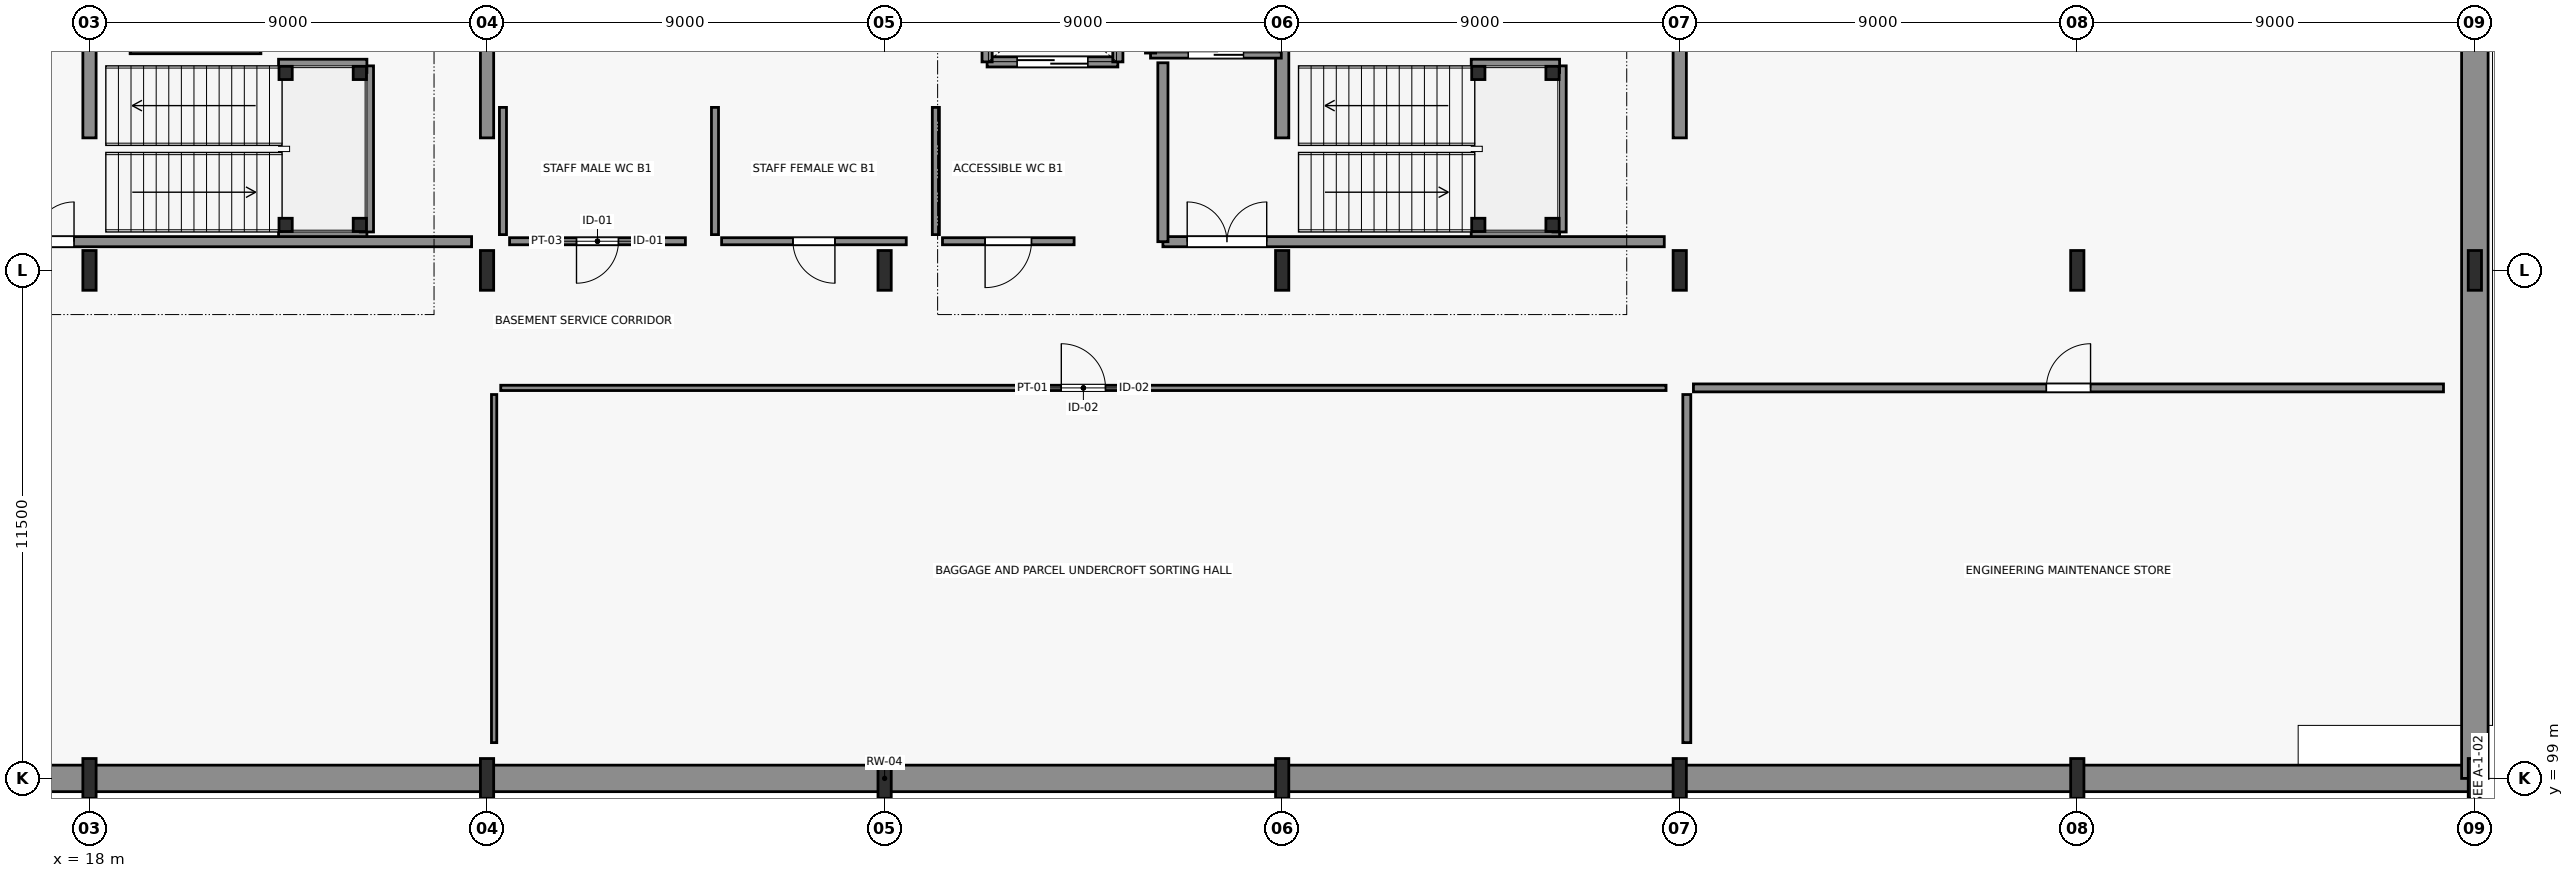
"""IFC4 building model, lengths in metres.
Left out: names, types, materials, properties, quantities, classifications, styles, units other than length and angle.
Written with IfcOpenShell. Run it as: python <this file> out.ifc"""

import sys

from ifc_helpers import new_model, si_unit, direction, frame, frame_2d, origin, origin_2d, place, context, subcontext, project, spatial, rectangle, hollow_rectangle, i_section, extrude, element, fill, save


model = new_model("IFC4")
c1 = context("Model", 3, precision=1e-05, world=origin(), true_north=direction((0.0, 1.0)))
c2 = subcontext(c1, "Body", "Model", "MODEL_VIEW")
j1 = project(units=[si_unit("LENGTHUNIT", "METRE"), si_unit("PLANEANGLEUNIT", "RADIAN")], contexts=[c1])
p1 = place(None, origin())
s1 = spatial("IfcSite", under=j1, at=p1, CompositionType="ELEMENT")
p2 = place(p1, origin())
s2 = spatial("IfcBuilding", under=s1, at=p2, CompositionType="ELEMENT")
p3 = place(p2, frame((0.0, 0.0, -4.8)))
s3 = spatial("IfcBuildingStorey", under=s2, at=p3, CompositionType="ELEMENT", Elevation=-4.8)
p4 = place(p3, frame((0.0, 99.0, 0.0), z_axis=(0.0, 0.0, 1.0), x_axis=(1.0, 0.0, 0.0)))
e1 = element("IfcWall", 1, at=p4, inside=s3, PredefinedType="USERDEFINED", context=c2, shape_type="SweptSolid", body=[
    extrude(rectangle(XDim=72.0, YDim=0.6, at=frame_2d((36.0, 0.0))), origin(), (0.0, 0.0, 1.0), 4.5),
])
p5 = place(p3, frame((72.0, 99.0, 0.0), z_axis=(0.0, 0.0, 1.0), x_axis=(0.0, 1.0, 0.0)))
e2 = element("IfcWall", 2, at=p5, inside=s3, PredefinedType="USERDEFINED", context=c2, shape_type="SweptSolid", body=[
    extrude(rectangle(XDim=33.0, YDim=0.6, at=frame_2d((16.5, 0.0))), origin(), (0.0, 0.0, 1.0), 4.5),
])
for number, where, z_axis, x_axis in (
    (3, (18.0, 99.0, 0.0), (0.0, 0.0, 1.0), (1.0, 0.0, 0.0)),
    (4, (18.0, 110.5, 0.0), (0.0, 0.0, 1.0), (1.0, 0.0, 0.0)),
    (5, (27.0, 99.0, 0.0), (0.0, 0.0, 1.0), (1.0, 0.0, 0.0)),
    (6, (27.0, 110.5, 0.0), (0.0, 0.0, 1.0), (1.0, 0.0, 0.0)),
    (7, (36.0, 99.0, 0.0), (0.0, 0.0, 1.0), (1.0, 0.0, 0.0)),
    (8, (36.0, 110.5, 0.0), (0.0, 0.0, 1.0), (1.0, 0.0, 0.0)),
    (9, (45.0, 99.0, 0.0), (0.0, 0.0, 1.0), (1.0, 0.0, 0.0)),
    (10, (45.0, 110.5, 0.0), (0.0, 0.0, 1.0), (1.0, 0.0, 0.0)),
    (11, (54.0, 99.0, 0.0), (0.0, 0.0, 1.0), (1.0, 0.0, 0.0)),
    (12, (54.0, 110.5, 0.0), (0.0, 0.0, 1.0), (1.0, 0.0, 0.0)),
    (13, (63.0, 99.0, 0.0), (0.0, 0.0, 1.0), (1.0, 0.0, 0.0)),
    (14, (63.0, 110.5, 0.0), (0.0, 0.0, 1.0), (1.0, 0.0, 0.0)),
    (15, (72.0, 99.0, 0.0), (0.0, 0.0, 1.0), (1.0, 0.0, 0.0)),
    (16, (72.0, 110.5, 0.0), (0.0, 0.0, 1.0), (1.0, 0.0, 0.0)),
):
    element("IfcColumn", number, at=place(p3, frame(where, z_axis=z_axis, x_axis=x_axis)), inside=s3, PredefinedType="COLUMN", context=c2, shape_type="SweptSolid", body=[
        extrude(i_section(OverallWidth=0.3, OverallDepth=0.9, WebThickness=0.019, FlangeThickness=0.035, FilletRadius=0.03, at=origin_2d()), origin(), (0.0, 0.0, 1.0), 4.5),
    ])
for number, where, z_axis, x_axis in (
    (17, (18.0, 113.5, 0.0), (0.0, 0.0, 1.0), (0.0, 1.0, 0.0)),
    (18, (27.0, 113.5, 0.0), (0.0, 0.0, 1.0), (0.0, 1.0, 0.0)),
    (19, (45.0, 113.5, 0.0), (0.0, 0.0, 1.0), (0.0, 1.0, 0.0)),
    (20, (54.0, 113.5, 0.0), (0.0, 0.0, 1.0), (0.0, 1.0, 0.0)),
):
    element("IfcWall", number, at=place(p3, frame(where, z_axis=z_axis, x_axis=x_axis)), inside=s3, PredefinedType="SHEAR", context=c2, shape_type="SweptSolid", body=[
        extrude(rectangle(XDim=4.825, YDim=0.3, at=frame_2d((2.413, 0.0))), origin(), (0.0, 0.0, 1.0), 4.5),
    ])
p6 = place(p3, frame((27.31, 107.84, 0.0), z_axis=(0.0, 0.0, 1.0), x_axis=(1.0, 0.0, 0.0)))
e21 = element("IfcWall", 21, at=p6, inside=s3, PredefinedType="PARTITIONING", context=c2, shape_type="SweptSolid", body=[
    extrude(rectangle(XDim=26.38, YDim=0.12, at=frame_2d((13.19, 0.0))), origin(), (0.0, 0.0, 1.0), 3.87),
])
p7 = place(p6, frame((12.69, 0.0, 0.0)))
e22 = element("IfcOpeningElement", 22, at=p7, cuts=e21, PredefinedType="OPENING", context=c2, shape_type="SweptSolid", body=[
    extrude(rectangle(XDim=1.0, YDim=2.15, at=frame_2d((0.5, 1.075))), frame((0.0, 0.07, 0.0), z_axis=(0.0, -1.0, 0.0), x_axis=(1.0, 0.0, 0.0)), (0.0, 0.0, 1.0), 0.14),
])
p8 = place(p3, frame((27.16, 99.81, 0.0), z_axis=(0.0, 0.0, 1.0), x_axis=(0.0, 1.0, 0.0)))
e23 = element("IfcWall", 23, at=p8, inside=s3, PredefinedType="PARTITIONING", context=c2, shape_type="SweptSolid", body=[
    extrude(rectangle(XDim=7.88, YDim=0.12, at=frame_2d((3.94, 0.0))), origin(), (0.0, 0.0, 1.0), 3.87),
])
p9 = place(p3, frame((54.31, 107.84, 0.0), z_axis=(0.0, 0.0, 1.0), x_axis=(1.0, 0.0, 0.0)))
e24 = element("IfcWall", 24, at=p9, inside=s3, PredefinedType="PARTITIONING", context=c2, shape_type="SweptSolid", body=[
    extrude(rectangle(XDim=16.98, YDim=0.18, at=frame_2d((8.49, 0.0))), origin(), (0.0, 0.0, 1.0), 3.87),
])
p10 = place(p9, frame((7.99, 0.0, 0.0)))
e25 = element("IfcOpeningElement", 25, at=p10, cuts=e24, PredefinedType="OPENING", context=c2, shape_type="SweptSolid", body=[
    extrude(rectangle(XDim=1.0, YDim=2.15, at=frame_2d((0.5, 1.075))), frame((0.0, 0.1, 0.0), z_axis=(0.0, -1.0, 0.0), x_axis=(1.0, 0.0, 0.0)), (0.0, 0.0, 1.0), 0.2),
])
p11 = place(p3, frame((54.16, 99.81, 0.0), z_axis=(0.0, 0.0, 1.0), x_axis=(0.0, 1.0, 0.0)))
e26 = element("IfcWall", 26, at=p11, inside=s3, PredefinedType="PARTITIONING", context=c2, shape_type="SweptSolid", body=[
    extrude(rectangle(XDim=7.88, YDim=0.18, at=frame_2d((3.94, 0.0))), origin(), (0.0, 0.0, 1.0), 3.87),
])
p12 = place(p3, frame((31.49, 111.16, 0.0), z_axis=(0.0, 0.0, 1.0), x_axis=(-1.0, 0.0, 0.0)))
e27 = element("IfcWall", 27, at=p12, inside=s3, PredefinedType="PARTITIONING", context=c2, shape_type="SweptSolid", body=[
    extrude(rectangle(XDim=3.98, YDim=0.16, at=frame_2d((1.99, 0.0))), origin(), (0.0, 0.0, 1.0), 4.2),
])
p13 = place(p12, frame((1.515, 0.0, 0.0)))
e28 = element("IfcOpeningElement", 28, at=p13, cuts=e27, PredefinedType="OPENING", context=c2, shape_type="SweptSolid", body=[
    extrude(rectangle(XDim=0.95, YDim=2.15, at=frame_2d((0.475, 1.075))), frame((0.0, 0.09, 0.0), z_axis=(0.0, -1.0, 0.0), x_axis=(1.0, 0.0, 0.0)), (0.0, 0.0, 1.0), 0.18),
])
p14 = place(p3, frame((27.36, 111.31, 0.0), z_axis=(0.0, 0.0, 1.0), x_axis=(0.0, 1.0, 0.0)))
e29 = element("IfcWall", 29, at=p14, inside=s3, PredefinedType="PARTITIONING", context=c2, shape_type="SweptSolid", body=[
    extrude(rectangle(XDim=2.88, YDim=0.16, at=frame_2d((1.44, 0.0))), origin(), (0.0, 0.0, 1.0), 4.45),
])
p15 = place(p3, frame((36.49, 111.16, 0.0), z_axis=(0.0, 0.0, 1.0), x_axis=(-1.0, 0.0, 0.0)))
e30 = element("IfcWall", 30, at=p15, inside=s3, PredefinedType="PARTITIONING", context=c2, shape_type="SweptSolid", body=[
    extrude(rectangle(XDim=4.18, YDim=0.16, at=frame_2d((2.09, 0.0))), origin(), (0.0, 0.0, 1.0), 3.87),
])
p16 = place(p15, frame((1.615, 0.0, 0.0)))
e31 = element("IfcOpeningElement", 31, at=p16, cuts=e30, PredefinedType="OPENING", context=c2, shape_type="SweptSolid", body=[
    extrude(rectangle(XDim=0.95, YDim=2.15, at=frame_2d((0.475, 1.075))), frame((0.0, 0.09, 0.0), z_axis=(0.0, -1.0, 0.0), x_axis=(1.0, 0.0, 0.0)), (0.0, 0.0, 1.0), 0.18),
])
p17 = place(p3, frame((32.16, 111.31, 0.0), z_axis=(0.0, 0.0, 1.0), x_axis=(0.0, 1.0, 0.0)))
e32 = element("IfcWall", 32, at=p17, inside=s3, PredefinedType="PARTITIONING", context=c2, shape_type="SweptSolid", body=[
    extrude(rectangle(XDim=2.88, YDim=0.16, at=frame_2d((1.44, 0.0))), origin(), (0.0, 0.0, 1.0), 4.45),
])
p18 = place(p3, frame((40.29, 111.16, 0.0), z_axis=(0.0, 0.0, 1.0), x_axis=(-1.0, 0.0, 0.0)))
e33 = element("IfcWall", 33, at=p18, inside=s3, PredefinedType="PARTITIONING", context=c2, shape_type="SweptSolid", body=[
    extrude(rectangle(XDim=2.98, YDim=0.16, at=frame_2d((1.49, 0.0))), origin(), (0.0, 0.0, 1.0), 4.2),
])
p19 = place(p18, frame((0.965, 0.0, 0.0)))
e34 = element("IfcOpeningElement", 34, at=p19, cuts=e33, PredefinedType="OPENING", context=c2, shape_type="SweptSolid", body=[
    extrude(rectangle(XDim=1.05, YDim=2.2, at=frame_2d((0.525, 1.1))), frame((0.0, 0.09, 0.0), z_axis=(0.0, -1.0, 0.0), x_axis=(1.0, 0.0, 0.0)), (0.0, 0.0, 1.0), 0.18),
])
p20 = place(p3, frame((37.16, 111.31, 0.0), z_axis=(0.0, 0.0, 1.0), x_axis=(0.0, 1.0, 0.0)))
e35 = element("IfcWall", 35, at=p20, inside=s3, PredefinedType="PARTITIONING", context=c2, shape_type="SweptSolid", body=[
    extrude(rectangle(XDim=2.88, YDim=0.16, at=frame_2d((1.44, 0.0))), origin(), (0.0, 0.0, 1.0), 4.45),
])
p21 = place(p3, frame((21.88, 115.52, 0.0), z_axis=(0.0, 0.0, 1.0), x_axis=(-1.0, 0.0, 0.0)))
e36 = element("IfcWall", 36, at=p21, inside=s3, PredefinedType="SOLIDWALL", context=c2, shape_type="SweptSolid", body=[
    extrude(rectangle(XDim=2.96, YDim=0.23, at=frame_2d((1.48, 0.0))), origin(), (0.0, 0.0, 1.0), 4.56),
])
p22 = place(p3, frame((44.98, 115.42, 0.0), z_axis=(0.0, 0.0, 1.0), x_axis=(-1.0, 0.0, 0.0)))
e37 = element("IfcWall", 37, at=p22, inside=s3, PredefinedType="SOLIDWALL", context=c2, shape_type="SweptSolid", body=[
    extrude(rectangle(XDim=2.96, YDim=0.23, at=frame_2d((1.48, 0.0))), origin(), (0.0, 0.0, 1.0), 3.87),
])
p23 = place(p22, frame((0.855, 0.0, 0.0)))
e38 = element("IfcOpeningElement", 38, at=p23, cuts=e37, PredefinedType="OPENING", context=c2, shape_type="SweptSolid", body=[
    extrude(rectangle(XDim=1.25, YDim=2.2, at=frame_2d((0.625, 1.1))), frame((0.0, 0.125, 0.0), z_axis=(0.0, -1.0, 0.0), x_axis=(1.0, 0.0, 0.0)), (0.0, 0.0, 1.0), 0.25),
])
p24 = place(p3, frame((42.02, 115.42, 0.0), z_axis=(0.0, 0.0, 1.0), x_axis=(0.0, 1.0, 0.0)))
e39 = element("IfcWall", 39, at=p24, inside=s3, PredefinedType="SOLIDWALL", context=c2, shape_type="SweptSolid", body=[
    extrude(rectangle(XDim=2.16, YDim=0.23, at=frame_2d((1.08, 0.0))), origin(), (0.0, 0.0, 1.0), 4.2),
])
p25 = place(p3, frame((41.28, 115.22, 0.0), z_axis=(0.0, 0.0, 1.0), x_axis=(-1.0, 0.0, 0.0)))
e40 = element("IfcWall", 40, at=p25, inside=s3, PredefinedType="SOLIDWALL", context=c2, shape_type="SweptSolid", body=[
    extrude(rectangle(XDim=2.96, YDim=0.23, at=frame_2d((1.48, 0.0))), origin(), (0.0, 0.0, 1.0), 4.2),
])
p26 = place(p25, frame((0.68, 0.0, 0.0)))
e41 = element("IfcOpeningElement", 41, at=p26, cuts=e40, PredefinedType="OPENING", context=c2, shape_type="SweptSolid", body=[
    extrude(rectangle(XDim=1.6, YDim=2.3, at=frame_2d((0.8, 1.15))), frame((0.0, 0.125, 0.0), z_axis=(0.0, -1.0, 0.0), x_axis=(1.0, 0.0, 0.0)), (0.0, 0.0, 1.0), 0.25),
])
for number, where, z_axis, x_axis in (
    (42, (38.32, 115.22, 0.0), (0.0, 0.0, 1.0), (0.0, 1.0, 0.0)),
    (43, (41.28, 117.78, 0.0), (0.0, 0.0, 1.0), (0.0, -1.0, 0.0)),
):
    element("IfcWall", number, at=place(p3, frame(where, z_axis=z_axis, x_axis=x_axis)), inside=s3, PredefinedType="SOLIDWALL", context=c2, shape_type="SweptSolid", body=[
        extrude(rectangle(XDim=2.56, YDim=0.23, at=frame_2d((1.28, 0.0))), origin(), (0.0, 0.0, 1.0), 4.56),
    ])
p27 = place(p3, frame((22.28, 111.37, 0.0), z_axis=(0.0, 0.0, 1.0), x_axis=(1.0, 0.0, 0.0)))
e44 = element("IfcWall", 44, at=p27, inside=s3, PredefinedType="SHEAR", context=c2, shape_type="SweptSolid", body=[
    extrude(rectangle(XDim=2.0, YDim=0.3, at=frame_2d((1.0, 0.0))), origin(), (0.0, 0.0, 1.0), 2.08),
])
p28 = place(p3, frame((24.28, 111.37, 0.0), z_axis=(0.0, 0.0, 1.0), x_axis=(0.0, 1.0, 0.0)))
e45 = element("IfcWall", 45, at=p28, inside=s3, PredefinedType="SHEAR", context=c2, shape_type="SweptSolid", body=[
    extrude(rectangle(XDim=3.76, YDim=0.3, at=frame_2d((1.88, 0.0))), origin(), (0.0, 0.0, 1.0), 2.08),
])
p29 = place(p3, frame((24.28, 115.13, 0.0), z_axis=(0.0, 0.0, 1.0), x_axis=(-1.0, 0.0, 0.0)))
e46 = element("IfcWall", 46, at=p29, inside=s3, PredefinedType="SHEAR", context=c2, shape_type="SweptSolid", body=[
    extrude(rectangle(XDim=2.0, YDim=0.3, at=frame_2d((1.0, 0.0))), origin(), (0.0, 0.0, 1.0), 2.08),
])
for number, where, z_axis, x_axis in (
    (47, (22.44, 111.53, 0.0), (0.0, 0.0, 1.0), (1.0, 0.0, 0.0)),
    (48, (24.12, 111.53, 0.0), (0.0, 0.0, 1.0), (1.0, 0.0, 0.0)),
    (49, (24.12, 114.97, 0.0), (0.0, 0.0, 1.0), (1.0, 0.0, 0.0)),
    (50, (22.44, 114.97, 0.0), (0.0, 0.0, 1.0), (1.0, 0.0, 0.0)),
):
    element("IfcColumn", number, at=place(p3, frame(where, z_axis=z_axis, x_axis=x_axis)), inside=s3, PredefinedType="COLUMN", context=c2, shape_type="SweptSolid", body=[
        extrude(hollow_rectangle(XDim=0.3, YDim=0.3, WallThickness=0.016, at=origin_2d()), origin(), (0.0, 0.0, 1.0), 4.8),
    ])
p30 = place(p3, frame((49.28, 111.37, 0.0), z_axis=(0.0, 0.0, 1.0), x_axis=(1.0, 0.0, 0.0)))
e51 = element("IfcWall", 51, at=p30, inside=s3, PredefinedType="SHEAR", context=c2, shape_type="SweptSolid", body=[
    extrude(rectangle(XDim=2.0, YDim=0.3, at=frame_2d((1.0, 0.0))), origin(), (0.0, 0.0, 1.0), 2.08),
])
p31 = place(p3, frame((51.28, 111.37, 0.0), z_axis=(0.0, 0.0, 1.0), x_axis=(0.0, 1.0, 0.0)))
e52 = element("IfcWall", 52, at=p31, inside=s3, PredefinedType="SHEAR", context=c2, shape_type="SweptSolid", body=[
    extrude(rectangle(XDim=3.76, YDim=0.3, at=frame_2d((1.88, 0.0))), origin(), (0.0, 0.0, 1.0), 2.08),
])
p32 = place(p3, frame((51.28, 115.13, 0.0), z_axis=(0.0, 0.0, 1.0), x_axis=(-1.0, 0.0, 0.0)))
e53 = element("IfcWall", 53, at=p32, inside=s3, PredefinedType="SHEAR", context=c2, shape_type="SweptSolid", body=[
    extrude(rectangle(XDim=2.0, YDim=0.3, at=frame_2d((1.0, 0.0))), origin(), (0.0, 0.0, 1.0), 2.08),
])
for number, where, z_axis, x_axis in (
    (54, (49.44, 111.53, 0.0), (0.0, 0.0, 1.0), (1.0, 0.0, 0.0)),
    (55, (51.12, 111.53, 0.0), (0.0, 0.0, 1.0), (1.0, 0.0, 0.0)),
    (56, (51.12, 114.97, 0.0), (0.0, 0.0, 1.0), (1.0, 0.0, 0.0)),
    (57, (49.44, 114.97, 0.0), (0.0, 0.0, 1.0), (1.0, 0.0, 0.0)),
):
    element("IfcColumn", number, at=place(p3, frame(where, z_axis=z_axis, x_axis=x_axis)), inside=s3, PredefinedType="COLUMN", context=c2, shape_type="SweptSolid", body=[
        extrude(hollow_rectangle(XDim=0.3, YDim=0.3, WallThickness=0.016, at=origin_2d()), origin(), (0.0, 0.0, 1.0), 4.8),
    ])
p33 = place(p3, frame((15.3, 111.15, 0.0), z_axis=(0.0, 0.0, 1.0), x_axis=(1.0, 0.0, 0.0)))
e58 = element("IfcWall", 58, at=p33, inside=s3, PredefinedType="SOLIDWALL", context=c2, shape_type="SweptSolid", body=[
    extrude(rectangle(XDim=11.35, YDim=0.23, at=frame_2d((5.675, 0.0))), origin(), (0.0, 0.0, 1.0), 3.87),
])
p34 = place(p33, frame((0.55, 0.0, 0.0)))
e59 = element("IfcOpeningElement", 59, at=p34, cuts=e58, PredefinedType="OPENING", context=c2, shape_type="SweptSolid", body=[
    extrude(rectangle(XDim=1.8, YDim=2.3, at=frame_2d((0.9, 1.15))), frame((0.0, 0.125, 0.0), z_axis=(0.0, -1.0, 0.0), x_axis=(1.0, 0.0, 0.0)), (0.0, 0.0, 1.0), 0.25),
])
p35 = place(p3, frame((42.3, 111.15, 0.0), z_axis=(0.0, 0.0, 1.0), x_axis=(1.0, 0.0, 0.0)))
e60 = element("IfcWall", 60, at=p35, inside=s3, PredefinedType="SOLIDWALL", context=c2, shape_type="SweptSolid", body=[
    extrude(rectangle(XDim=11.35, YDim=0.23, at=frame_2d((5.675, 0.0))), origin(), (0.0, 0.0, 1.0), 3.87),
])
p36 = place(p35, frame((0.55, 0.0, 0.0)))
e61 = element("IfcOpeningElement", 61, at=p36, cuts=e60, PredefinedType="OPENING", context=c2, shape_type="SweptSolid", body=[
    extrude(rectangle(XDim=1.8, YDim=2.3, at=frame_2d((0.9, 1.15))), frame((0.0, 0.125, 0.0), z_axis=(0.0, -1.0, 0.0), x_axis=(1.0, 0.0, 0.0)), (0.0, 0.0, 1.0), 0.25),
])
p37 = place(p3, frame((42.3, 111.15, 0.0), z_axis=(0.0, 0.0, 1.0), x_axis=(0.0, 1.0, 0.0)))
e62 = element("IfcWall", 62, at=p37, inside=s3, PredefinedType="SOLIDWALL", context=c2, shape_type="SweptSolid", body=[
    extrude(rectangle(XDim=4.05, YDim=0.23, at=frame_2d((2.025, 0.0))), origin(), (0.0, 0.0, 1.0), 4.55),
])
p38 = place(p7, origin())
e63 = element("IfcDoor", 63, at=p38, inside=s3, OperationType="SINGLE_SWING_LEFT", PredefinedType="DOOR", context=c2, shape_type="SweptSolid", body=[
    extrude(rectangle(XDim=1.0, YDim=2.15, at=frame_2d((0.5, 1.075))), frame((0.0, 0.025, 0.0), z_axis=(0.0, -1.0, 0.0), x_axis=(1.0, 0.0, 0.0)), (0.0, 0.0, 1.0), 0.05),
])
fill(e22, e63)
p39 = place(p10, origin())
e64 = element("IfcDoor", 64, at=p39, inside=s3, OperationType="SINGLE_SWING_RIGHT", PredefinedType="DOOR", context=c2, shape_type="SweptSolid", body=[
    extrude(rectangle(XDim=1.0, YDim=2.15, at=frame_2d((0.5, 1.075))), frame((0.0, 0.025, 0.0), z_axis=(0.0, -1.0, 0.0), x_axis=(1.0, 0.0, 0.0)), (0.0, 0.0, 1.0), 0.05),
])
fill(e25, e64)
p40 = place(p13, origin())
e65 = element("IfcDoor", 65, at=p40, inside=s3, OperationType="SINGLE_SWING_RIGHT", PredefinedType="DOOR", context=c2, shape_type="SweptSolid", body=[
    extrude(rectangle(XDim=0.95, YDim=2.15, at=frame_2d((0.475, 1.075))), frame((0.0, 0.025, 0.0), z_axis=(0.0, -1.0, 0.0), x_axis=(1.0, 0.0, 0.0)), (0.0, 0.0, 1.0), 0.05),
])
fill(e28, e65)
p41 = place(p16, origin())
e66 = element("IfcDoor", 66, at=p41, inside=s3, OperationType="SINGLE_SWING_LEFT", PredefinedType="DOOR", context=c2, shape_type="SweptSolid", body=[
    extrude(rectangle(XDim=0.95, YDim=2.15, at=frame_2d((0.475, 1.075))), frame((0.0, 0.025, 0.0), z_axis=(0.0, -1.0, 0.0), x_axis=(1.0, 0.0, 0.0)), (0.0, 0.0, 1.0), 0.05),
])
fill(e31, e66)
p42 = place(p19, origin())
e67 = element("IfcDoor", 67, at=p42, inside=s3, OperationType="SINGLE_SWING_RIGHT", PredefinedType="DOOR", context=c2, shape_type="SweptSolid", body=[
    extrude(rectangle(XDim=1.05, YDim=2.2, at=frame_2d((0.525, 1.1))), frame((0.0, 0.025, 0.0), z_axis=(0.0, -1.0, 0.0), x_axis=(1.0, 0.0, 0.0)), (0.0, 0.0, 1.0), 0.05),
])
fill(e34, e67)
p43 = place(p23, origin())
e68 = element("IfcDoor", 68, at=p43, inside=s3, OperationType="DOUBLE_DOOR_SLIDING", PredefinedType="DOOR", context=c2, shape_type="SweptSolid", body=[
    extrude(rectangle(XDim=1.25, YDim=2.2, at=frame_2d((0.625, 1.1))), frame((0.0, 0.025, 0.0), z_axis=(0.0, -1.0, 0.0), x_axis=(1.0, 0.0, 0.0)), (0.0, 0.0, 1.0), 0.05),
])
fill(e38, e68)
p44 = place(p26, origin())
e69 = element("IfcDoor", 69, at=p44, inside=s3, OperationType="DOUBLE_DOOR_SLIDING", PredefinedType="DOOR", context=c2, shape_type="SweptSolid", body=[
    extrude(rectangle(XDim=1.6, YDim=2.3, at=frame_2d((0.8, 1.15))), frame((0.0, 0.025, 0.0), z_axis=(0.0, -1.0, 0.0), x_axis=(1.0, 0.0, 0.0)), (0.0, 0.0, 1.0), 0.05),
])
fill(e41, e69)
p45 = place(p34, origin())
e70 = element("IfcDoor", 70, at=p45, inside=s3, OperationType="DOUBLE_DOOR_SINGLE_SWING", PredefinedType="DOOR", context=c2, shape_type="SweptSolid", body=[
    extrude(rectangle(XDim=1.8, YDim=2.3, at=frame_2d((0.9, 1.15))), frame((0.0, 0.025, 0.0), z_axis=(0.0, -1.0, 0.0), x_axis=(1.0, 0.0, 0.0)), (0.0, 0.0, 1.0), 0.05),
])
fill(e59, e70)
p46 = place(p36, origin())
e71 = element("IfcDoor", 71, at=p46, inside=s3, OperationType="DOUBLE_DOOR_SINGLE_SWING", PredefinedType="DOOR", context=c2, shape_type="SweptSolid", body=[
    extrude(rectangle(XDim=1.8, YDim=2.3, at=frame_2d((0.9, 1.15))), frame((0.0, 0.025, 0.0), z_axis=(0.0, -1.0, 0.0), x_axis=(1.0, 0.0, 0.0)), (0.0, 0.0, 1.0), 0.05),
])
fill(e61, e71)
save(model, sys.argv[1])
